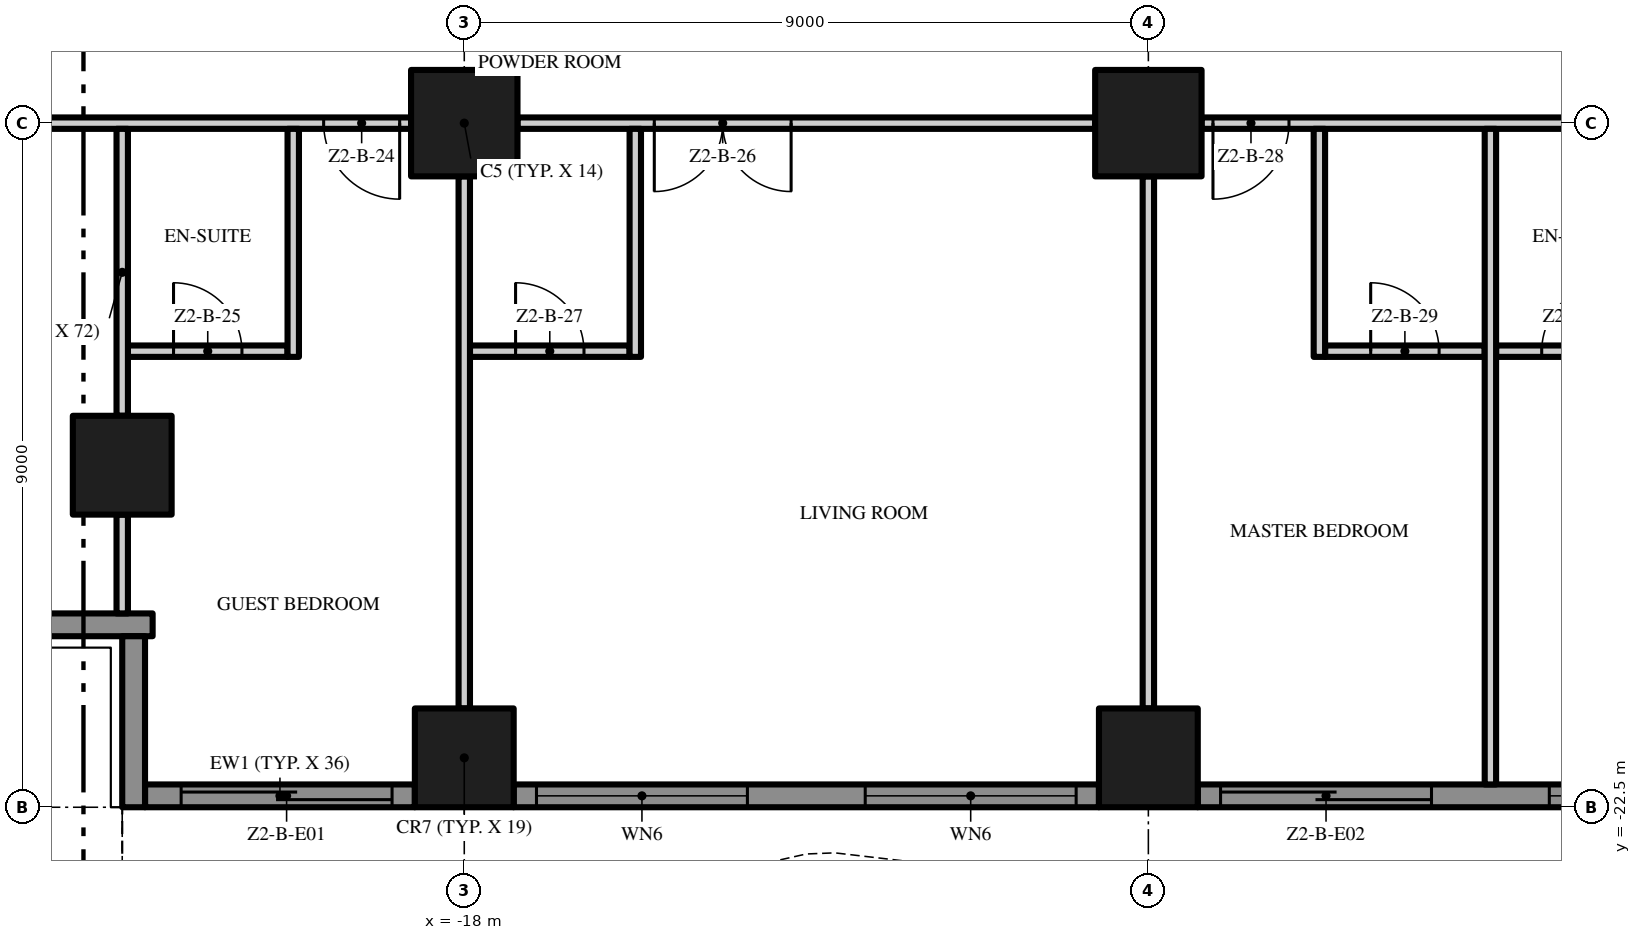
"""IFC4 building model, lengths in metres.
Left out: names, types, materials, properties, quantities, classifications, styles, units other than length and angle.
Written with IfcOpenShell. Run it as: python <this file> out.ifc"""

import sys

from ifc_helpers import new_model, si_unit, direction, frame, frame_2d, origin, origin_2d, place, context, subcontext, project, spatial, polyline, rectangle, outline, extrude, element, fill, save


model = new_model("IFC4")
c1 = context("Model", 3, precision=1e-05, world=origin(), true_north=direction((0.0, 1.0)))
c2 = subcontext(c1, "Body", "Model", "MODEL_VIEW")
j1 = project(units=[si_unit("LENGTHUNIT", "METRE"), si_unit("PLANEANGLEUNIT", "RADIAN")], contexts=[c1])
p1 = place(None, origin())
s1 = spatial("IfcSite", under=j1, at=p1, CompositionType="ELEMENT")
p2 = place(p1, origin())
s2 = spatial("IfcBuilding", under=s1, at=p2, CompositionType="ELEMENT")
p3 = place(p2, frame((0.0, 0.0, 80.8)))
s3 = spatial("IfcBuildingStorey", under=s2, at=p3, CompositionType="ELEMENT", Elevation=80.8)
p4 = place(p3, frame((-18.0, -13.5, 0.0), z_axis=(0.0, 0.0, 1.0), x_axis=(1.0, 0.0, 0.0)))
e1 = element("IfcColumn", 1, at=p4, inside=s3, PredefinedType="COLUMN", context=c2, shape_type="SweptSolid", body=[
    extrude(rectangle(XDim=1.4, YDim=1.4, at=origin_2d()), origin(), (0.0, 0.0, 1.0), 3.5),
])
for number, where, z_axis, x_axis in (
    (2, (-18.0, -21.85, 0.0), (0.0, 0.0, 1.0), (1.0, 0.0, 0.0)),
    (3, (-22.5, -18.0, 0.0), (0.0, 0.0, 1.0), (1.0, 0.0, 0.0)),
):
    element("IfcColumn", number, at=place(p3, frame(where, z_axis=z_axis, x_axis=x_axis)), inside=s3, PredefinedType="COLUMN", context=c2, shape_type="SweptSolid", body=[
        extrude(rectangle(XDim=1.3, YDim=1.3, at=origin_2d()), origin(), (0.0, 0.0, 1.0), 3.5),
    ])
p5 = place(p3, frame((-9.0, -13.5, 0.0), z_axis=(0.0, 0.0, 1.0), x_axis=(1.0, 0.0, 0.0)))
e4 = element("IfcColumn", 4, at=p5, inside=s3, PredefinedType="COLUMN", context=c2, shape_type="SweptSolid", body=[
    extrude(rectangle(XDim=1.4, YDim=1.4, at=origin_2d()), origin(), (0.0, 0.0, 1.0), 3.5),
])
p6 = place(p3, frame((-9.0, -21.85, 0.0), z_axis=(0.0, 0.0, 1.0), x_axis=(1.0, 0.0, 0.0)))
e5 = element("IfcColumn", 5, at=p6, inside=s3, PredefinedType="COLUMN", context=c2, shape_type="SweptSolid", body=[
    extrude(rectangle(XDim=1.3, YDim=1.3, at=origin_2d()), origin(), (0.0, 0.0, 1.0), 3.5),
])
p7 = place(p3, frame((-18.65, -22.35, 0.0), z_axis=(0.0, 0.0, 1.0), x_axis=(-1.0, 0.0, 0.0)))
e6 = element("IfcWall", 6, at=p7, inside=s3, PredefinedType="SOLIDWALL", context=c2, shape_type="SweptSolid", body=[
    extrude(rectangle(XDim=3.55, YDim=0.3, at=frame_2d((1.775, 0.0))), origin(), (0.0, 0.0, 1.0), 3.5),
])
p8 = place(p7, frame((0.3, 0.0, 0.0)))
e7 = element("IfcOpeningElement", 7, at=p8, cuts=e6, PredefinedType="OPENING", context=c2, shape_type="SweptSolid", body=[
    extrude(rectangle(XDim=2.775, YDim=2.4, at=frame_2d((1.387, 1.2))), frame((0.0, 0.16, 0.0), z_axis=(0.0, -1.0, 0.0), x_axis=(1.0, 0.0, 0.0)), (0.0, 0.0, 1.0), 0.32),
])
p9 = place(p3, frame((-9.65, -22.35, 0.0), z_axis=(0.0, 0.0, 1.0), x_axis=(-1.0, 0.0, 0.0)))
e8 = element("IfcWall", 8, at=p9, inside=s3, PredefinedType="SOLIDWALL", context=c2, shape_type="SweptSolid", body=[
    extrude(rectangle(XDim=7.7, YDim=0.3, at=frame_2d((3.85, 0.0))), origin(), (0.0, 0.0, 1.0), 3.5),
])
p10 = place(p9, frame((4.625, 0.0, 0.45)))
e9 = element("IfcOpeningElement", 9, at=p10, cuts=e8, PredefinedType="OPENING", context=c2, shape_type="SweptSolid", body=[
    extrude(rectangle(XDim=2.775, YDim=2.65, at=frame_2d((1.387, 1.325))), frame((0.0, 0.16, 0.0), z_axis=(0.0, -1.0, 0.0), x_axis=(1.0, 0.0, 0.0)), (0.0, 0.0, 1.0), 0.32),
])
p11 = place(p9, frame((0.3, 0.0, 0.45)))
e10 = element("IfcOpeningElement", 10, at=p11, cuts=e8, PredefinedType="OPENING", context=c2, shape_type="SweptSolid", body=[
    extrude(rectangle(XDim=2.775, YDim=2.65, at=frame_2d((1.387, 1.325))), frame((0.0, 0.16, 0.0), z_axis=(0.0, -1.0, 0.0), x_axis=(1.0, 0.0, 0.0)), (0.0, 0.0, 1.0), 0.32),
])
p12 = place(p3, frame((-0.65, -22.35, 0.0), z_axis=(0.0, 0.0, 1.0), x_axis=(-1.0, 0.0, 0.0)))
e11 = element("IfcWall", 11, at=p12, inside=s3, PredefinedType="SOLIDWALL", context=c2, shape_type="SweptSolid", body=[
    extrude(rectangle(XDim=7.7, YDim=0.3, at=frame_2d((3.85, 0.0))), origin(), (0.0, 0.0, 1.0), 3.5),
])
p13 = place(p12, frame((4.625, 0.0, 0.0)))
e12 = element("IfcOpeningElement", 12, at=p13, cuts=e11, PredefinedType="OPENING", context=c2, shape_type="SweptSolid", body=[
    extrude(rectangle(XDim=2.775, YDim=2.4, at=frame_2d((1.387, 1.2))), frame((0.0, 0.16, 0.0), z_axis=(0.0, -1.0, 0.0), x_axis=(1.0, 0.0, 0.0)), (0.0, 0.0, 1.0), 0.32),
])
p14 = place(p12, frame((0.3, 0.0, 0.45)))
e13 = element("IfcOpeningElement", 13, at=p14, cuts=e11, PredefinedType="OPENING", context=c2, shape_type="SweptSolid", body=[
    extrude(rectangle(XDim=2.775, YDim=2.65, at=frame_2d((1.387, 1.325))), frame((0.0, 0.16, 0.0), z_axis=(0.0, -1.0, 0.0), x_axis=(1.0, 0.0, 0.0)), (0.0, 0.0, 1.0), 0.32),
])
p15 = place(p3, frame((-22.1, -20.1, 0.0), z_axis=(0.0, 0.0, 1.0), x_axis=(-1.0, 0.0, 0.0)))
e14 = element("IfcWall", 14, at=p15, inside=s3, PredefinedType="SOLIDWALL", context=c2, shape_type="SweptSolid", body=[
    extrude(rectangle(XDim=2.35, YDim=0.3, at=frame_2d((1.175, 0.0))), origin(), (0.0, 0.0, 1.0), 3.5),
])
p16 = place(p3, frame((-22.35, -22.5, 0.0), z_axis=(0.0, 0.0, 1.0), x_axis=(0.0, 1.0, 0.0)))
e15 = element("IfcWall", 15, at=p16, inside=s3, PredefinedType="SOLIDWALL", context=c2, shape_type="SweptSolid", body=[
    extrude(rectangle(XDim=2.25, YDim=0.3, at=frame_2d((1.125, 0.0))), origin(), (0.0, 0.0, 1.0), 3.5),
])
p17 = place(p3, origin())
e16 = element("IfcWall", 16, at=p17, inside=s3, PredefinedType="USERDEFINED", context=c2, shape_type="SweptSolid", body=[
    extrude(outline(polyline([(-22.5, -25.149), (-21.0, -25.485), (-20.625, -25.5), (-19.5, -25.369), (-18.0, -24.845), (-16.5, -24.112), (-15.0, -23.451), (-13.5, -23.115), (-13.125, -23.1), (-12.0, -23.231), (-10.5, -23.755), (-9.0, -24.488), (-7.5, -25.149), (-6.0, -25.485), (-5.625, -25.5), (-4.5, -25.369), (-3.0, -24.845), (-1.5, -24.112), (0.0, -23.451), (1.5, -23.115), (1.875, -23.1), (3.0, -23.231), (4.5, -23.755), (6.0, -24.488), (7.5, -25.149), (9.0, -25.485), (9.375, -25.5), (10.5, -25.369), (12.0, -24.845), (13.5, -24.112), (15.0, -23.451), (16.5, -23.115), (16.875, -23.1), (18.0, -23.231), (19.5, -23.755), (21.0, -24.488), (22.5, -25.149), (22.601, -24.92), (21.105, -24.261), (19.596, -23.524), (18.056, -22.986), (16.885, -22.849), (16.467, -22.866), (14.921, -23.213), (13.395, -23.885), (11.904, -24.614), (10.444, -25.124), (9.365, -25.249), (9.033, -25.236), (7.579, -24.91), (6.105, -24.261), (4.596, -23.524), (3.056, -22.986), (1.885, -22.849), (1.467, -22.866), (-0.079, -23.213), (-1.605, -23.885), (-3.096, -24.614), (-4.556, -25.124), (-5.635, -25.249), (-5.967, -25.236), (-7.421, -24.91), (-8.895, -24.261), (-10.404, -23.524), (-11.944, -22.986), (-13.115, -22.849), (-13.533, -22.866), (-15.079, -23.213), (-16.605, -23.885), (-18.096, -24.614), (-19.556, -25.124), (-20.635, -25.249), (-20.967, -25.236), (-22.445, -24.905), (-22.5, -25.149)])), origin(), (0.0, 0.0, 1.0), 0.9),
])
p18 = place(p3, frame((-22.425, -16.5, 0.0), z_axis=(0.0, 0.0, 1.0), x_axis=(1.0, 0.0, 0.0)))
e17 = element("IfcWall", 17, at=p18, inside=s3, PredefinedType="PARTITIONING", context=c2, shape_type="SweptSolid", body=[
    extrude(rectangle(XDim=2.1, YDim=0.15, at=frame_2d((1.05, 0.0))), origin(), (0.0, 0.0, 1.0), 3.5),
])
p19 = place(p18, frame((0.6, 0.0, 0.0)))
e18 = element("IfcOpeningElement", 18, at=p19, cuts=e17, PredefinedType="OPENING", context=c2, shape_type="SweptSolid", body=[
    extrude(rectangle(XDim=0.9, YDim=2.1, at=frame_2d((0.45, 1.05))), frame((0.0, 0.085, 0.0), z_axis=(0.0, -1.0, 0.0), x_axis=(1.0, 0.0, 0.0)), (0.0, 0.0, 1.0), 0.17),
])
p20 = place(p3, frame((-17.925, -16.5, 0.0), z_axis=(0.0, 0.0, 1.0), x_axis=(1.0, 0.0, 0.0)))
e19 = element("IfcWall", 19, at=p20, inside=s3, PredefinedType="PARTITIONING", context=c2, shape_type="SweptSolid", body=[
    extrude(rectangle(XDim=2.1, YDim=0.15, at=frame_2d((1.05, 0.0))), origin(), (0.0, 0.0, 1.0), 3.5),
])
p21 = place(p20, frame((0.6, 0.0, 0.0)))
e20 = element("IfcOpeningElement", 20, at=p21, cuts=e19, PredefinedType="OPENING", context=c2, shape_type="SweptSolid", body=[
    extrude(rectangle(XDim=0.9, YDim=2.1, at=frame_2d((0.45, 1.05))), frame((0.0, 0.085, 0.0), z_axis=(0.0, -1.0, 0.0), x_axis=(1.0, 0.0, 0.0)), (0.0, 0.0, 1.0), 0.17),
])
p22 = place(p3, frame((-6.675, -16.5, 0.0), z_axis=(0.0, 0.0, 1.0), x_axis=(1.0, 0.0, 0.0)))
e21 = element("IfcWall", 21, at=p22, inside=s3, PredefinedType="PARTITIONING", context=c2, shape_type="SweptSolid", body=[
    extrude(rectangle(XDim=2.1, YDim=0.15, at=frame_2d((1.05, 0.0))), origin(), (0.0, 0.0, 1.0), 3.5),
])
p23 = place(p22, frame((0.6, 0.0, 0.0)))
e22 = element("IfcOpeningElement", 22, at=p23, cuts=e21, PredefinedType="OPENING", context=c2, shape_type="SweptSolid", body=[
    extrude(rectangle(XDim=0.9, YDim=2.1, at=frame_2d((0.45, 1.05))), frame((0.0, 0.085, 0.0), z_axis=(0.0, -1.0, 0.0), x_axis=(1.0, 0.0, 0.0)), (0.0, 0.0, 1.0), 0.17),
])
p24 = place(p3, frame((-4.425, -16.5, 0.0), z_axis=(0.0, 0.0, 1.0), x_axis=(1.0, 0.0, 0.0)))
e23 = element("IfcWall", 23, at=p24, inside=s3, PredefinedType="PARTITIONING", context=c2, shape_type="SweptSolid", body=[
    extrude(rectangle(XDim=2.1, YDim=0.15, at=frame_2d((1.05, 0.0))), origin(), (0.0, 0.0, 1.0), 3.5),
])
p25 = place(p24, frame((0.6, 0.0, 0.0)))
e24 = element("IfcOpeningElement", 24, at=p25, cuts=e23, PredefinedType="OPENING", context=c2, shape_type="SweptSolid", body=[
    extrude(rectangle(XDim=0.9, YDim=2.1, at=frame_2d((0.45, 1.05))), frame((0.0, 0.085, 0.0), z_axis=(0.0, -1.0, 0.0), x_axis=(1.0, 0.0, 0.0)), (0.0, 0.0, 1.0), 0.17),
])
p26 = place(p3, frame((-18.7, -13.5, 0.0), z_axis=(0.0, 0.0, 1.0), x_axis=(-1.0, 0.0, 0.0)))
e25 = element("IfcWall", 25, at=p26, inside=s3, PredefinedType="PARTITIONING", context=c2, shape_type="SweptSolid", body=[
    extrude(rectangle(XDim=7.0, YDim=0.15, at=frame_2d((3.5, 0.0))), origin(), (0.0, 0.0, 1.0), 3.5),
])
p27 = place(p26, frame((5.55, 0.0, 0.0)))
e26 = element("IfcOpeningElement", 26, at=p27, cuts=e25, PredefinedType="OPENING", context=c2, shape_type="SweptSolid", body=[
    extrude(rectangle(XDim=1.0, YDim=2.4, at=frame_2d((0.5, 1.2))), frame((0.0, 0.085, 0.0), z_axis=(0.0, -1.0, 0.0), x_axis=(1.0, 0.0, 0.0)), (0.0, 0.0, 1.0), 0.17),
])
p28 = place(p26, frame((0.15, 0.0, 0.0)))
e27 = element("IfcOpeningElement", 27, at=p28, cuts=e25, PredefinedType="OPENING", context=c2, shape_type="SweptSolid", body=[
    extrude(rectangle(XDim=1.0, YDim=2.4, at=frame_2d((0.5, 1.2))), frame((0.0, 0.085, 0.0), z_axis=(0.0, -1.0, 0.0), x_axis=(1.0, 0.0, 0.0)), (0.0, 0.0, 1.0), 0.17),
])
p29 = place(p3, frame((-9.7, -13.5, 0.0), z_axis=(0.0, 0.0, 1.0), x_axis=(-1.0, 0.0, 0.0)))
e28 = element("IfcWall", 28, at=p29, inside=s3, PredefinedType="PARTITIONING", context=c2, shape_type="SweptSolid", body=[
    extrude(rectangle(XDim=7.6, YDim=0.15, at=frame_2d((3.8, 0.0))), origin(), (0.0, 0.0, 1.0), 3.5),
])
p30 = place(p29, frame((4.0, 0.0, 0.0)))
e29 = element("IfcOpeningElement", 29, at=p30, cuts=e28, PredefinedType="OPENING", context=c2, shape_type="SweptSolid", body=[
    extrude(rectangle(XDim=1.8, YDim=2.4, at=frame_2d((0.9, 1.2))), frame((0.0, 0.085, 0.0), z_axis=(0.0, -1.0, 0.0), x_axis=(1.0, 0.0, 0.0)), (0.0, 0.0, 1.0), 0.17),
])
p31 = place(p3, frame((-0.7, -13.5, 0.0), z_axis=(0.0, 0.0, 1.0), x_axis=(-1.0, 0.0, 0.0)))
e30 = element("IfcWall", 30, at=p31, inside=s3, PredefinedType="PARTITIONING", context=c2, shape_type="SweptSolid", body=[
    extrude(rectangle(XDim=7.6, YDim=0.15, at=frame_2d((3.8, 0.0))), origin(), (0.0, 0.0, 1.0), 3.5),
])
p32 = place(p31, frame((6.45, 0.0, 0.0)))
e31 = element("IfcOpeningElement", 31, at=p32, cuts=e30, PredefinedType="OPENING", context=c2, shape_type="SweptSolid", body=[
    extrude(rectangle(XDim=1.0, YDim=2.4, at=frame_2d((0.5, 1.2))), frame((0.0, 0.085, 0.0), z_axis=(0.0, -1.0, 0.0), x_axis=(1.0, 0.0, 0.0)), (0.0, 0.0, 1.0), 0.17),
])
p33 = place(p31, frame((0.15, 0.0, 0.0)))
e32 = element("IfcOpeningElement", 32, at=p33, cuts=e30, PredefinedType="OPENING", context=c2, shape_type="SweptSolid", body=[
    extrude(rectangle(XDim=1.0, YDim=2.4, at=frame_2d((0.5, 1.2))), frame((0.0, 0.085, 0.0), z_axis=(0.0, -1.0, 0.0), x_axis=(1.0, 0.0, 0.0)), (0.0, 0.0, 1.0), 0.17),
])
p34 = place(p3, frame((-22.5, -19.95, 0.0), z_axis=(0.0, 0.0, 1.0), x_axis=(0.0, 1.0, 0.0)))
e33 = element("IfcWall", 33, at=p34, inside=s3, PredefinedType="PARTITIONING", context=c2, shape_type="SweptSolid", body=[
    extrude(rectangle(XDim=1.3, YDim=0.15, at=frame_2d((0.65, 0.0))), origin(), (0.0, 0.0, 1.0), 3.5),
])
p35 = place(p3, frame((-22.5, -17.35, 0.0), z_axis=(0.0, 0.0, 1.0), x_axis=(0.0, 1.0, 0.0)))
e34 = element("IfcWall", 34, at=p35, inside=s3, PredefinedType="PARTITIONING", context=c2, shape_type="SweptSolid", body=[
    extrude(rectangle(XDim=3.775, YDim=0.15, at=frame_2d((1.887, 0.0))), origin(), (0.0, 0.0, 1.0), 3.5),
])
p36 = place(p3, frame((-20.25, -16.575, 0.0), z_axis=(0.0, 0.0, 1.0), x_axis=(0.0, 1.0, 0.0)))
e35 = element("IfcWall", 35, at=p36, inside=s3, PredefinedType="PARTITIONING", context=c2, shape_type="SweptSolid", body=[
    extrude(rectangle(XDim=3.0, YDim=0.15, at=frame_2d((1.5, 0.0))), origin(), (0.0, 0.0, 1.0), 3.5),
])
p37 = place(p3, frame((-18.0, -21.2, 0.0), z_axis=(0.0, 0.0, 1.0), x_axis=(0.0, 1.0, 0.0)))
e36 = element("IfcWall", 36, at=p37, inside=s3, PredefinedType="PARTITIONING", context=c2, shape_type="SweptSolid", body=[
    extrude(rectangle(XDim=7.0, YDim=0.15, at=frame_2d((3.5, 0.0))), origin(), (0.0, 0.0, 1.0), 3.5),
])
p38 = place(p3, frame((-15.75, -16.575, 0.0), z_axis=(0.0, 0.0, 1.0), x_axis=(0.0, 1.0, 0.0)))
e37 = element("IfcWall", 37, at=p38, inside=s3, PredefinedType="PARTITIONING", context=c2, shape_type="SweptSolid", body=[
    extrude(rectangle(XDim=3.0, YDim=0.15, at=frame_2d((1.5, 0.0))), origin(), (0.0, 0.0, 1.0), 3.5),
])
p39 = place(p3, frame((-9.0, -21.2, 0.0), z_axis=(0.0, 0.0, 1.0), x_axis=(0.0, 1.0, 0.0)))
e38 = element("IfcWall", 38, at=p39, inside=s3, PredefinedType="PARTITIONING", context=c2, shape_type="SweptSolid", body=[
    extrude(rectangle(XDim=7.0, YDim=0.15, at=frame_2d((3.5, 0.0))), origin(), (0.0, 0.0, 1.0), 3.5),
])
p40 = place(p3, frame((-6.75, -16.575, 0.0), z_axis=(0.0, 0.0, 1.0), x_axis=(0.0, 1.0, 0.0)))
e39 = element("IfcWall", 39, at=p40, inside=s3, PredefinedType="PARTITIONING", context=c2, shape_type="SweptSolid", body=[
    extrude(rectangle(XDim=3.0, YDim=0.15, at=frame_2d((1.5, 0.0))), origin(), (0.0, 0.0, 1.0), 3.5),
])
p41 = place(p3, frame((-4.5, -22.2, 0.0), z_axis=(0.0, 0.0, 1.0), x_axis=(0.0, 1.0, 0.0)))
e40 = element("IfcWall", 40, at=p41, inside=s3, PredefinedType="PARTITIONING", context=c2, shape_type="SweptSolid", body=[
    extrude(rectangle(XDim=8.625, YDim=0.15, at=frame_2d((4.312, 0.0))), origin(), (0.0, 0.0, 1.0), 3.5),
])
p42 = place(p8, origin())
e41 = element("IfcDoor", 41, at=p42, inside=s3, OperationType="SINGLE_SWING_LEFT", PredefinedType="DOOR", context=c2, shape_type="SweptSolid", body=[
    extrude(rectangle(XDim=2.775, YDim=2.4, at=frame_2d((1.387, 1.2))), frame((0.0, 0.025, 0.0), z_axis=(0.0, -1.0, 0.0), x_axis=(1.0, 0.0, 0.0)), (0.0, 0.0, 1.0), 0.05),
])
fill(e7, e41)
p43 = place(p10, origin())
e42 = element("IfcWindow", 42, at=p43, inside=s3, PartitioningType="SINGLE_PANEL", PredefinedType="WINDOW", context=c2, shape_type="SweptSolid", body=[
    extrude(rectangle(XDim=2.775, YDim=2.65, at=frame_2d((1.387, 1.325))), frame((0.0, 0.03, 0.0), z_axis=(0.0, -1.0, 0.0), x_axis=(1.0, 0.0, 0.0)), (0.0, 0.0, 1.0), 0.06),
])
fill(e9, e42)
p44 = place(p11, origin())
e43 = element("IfcWindow", 43, at=p44, inside=s3, PartitioningType="SINGLE_PANEL", PredefinedType="WINDOW", context=c2, shape_type="SweptSolid", body=[
    extrude(rectangle(XDim=2.775, YDim=2.65, at=frame_2d((1.387, 1.325))), frame((0.0, 0.03, 0.0), z_axis=(0.0, -1.0, 0.0), x_axis=(1.0, 0.0, 0.0)), (0.0, 0.0, 1.0), 0.06),
])
fill(e10, e43)
p45 = place(p13, origin())
e44 = element("IfcDoor", 44, at=p45, inside=s3, OperationType="SINGLE_SWING_LEFT", PredefinedType="DOOR", context=c2, shape_type="SweptSolid", body=[
    extrude(rectangle(XDim=2.775, YDim=2.4, at=frame_2d((1.387, 1.2))), frame((0.0, 0.025, 0.0), z_axis=(0.0, -1.0, 0.0), x_axis=(1.0, 0.0, 0.0)), (0.0, 0.0, 1.0), 0.05),
])
fill(e12, e44)
p46 = place(p14, origin())
e45 = element("IfcWindow", 45, at=p46, inside=s3, PartitioningType="SINGLE_PANEL", PredefinedType="WINDOW", context=c2, shape_type="SweptSolid", body=[
    extrude(rectangle(XDim=2.775, YDim=2.65, at=frame_2d((1.387, 1.325))), frame((0.0, 0.03, 0.0), z_axis=(0.0, -1.0, 0.0), x_axis=(1.0, 0.0, 0.0)), (0.0, 0.0, 1.0), 0.06),
])
fill(e13, e45)
p47 = place(p28, origin())
e46 = element("IfcDoor", 46, at=p47, inside=s3, OperationType="SINGLE_SWING_LEFT", PredefinedType="DOOR", context=c2, shape_type="SweptSolid", body=[
    extrude(rectangle(XDim=1.0, YDim=2.4, at=frame_2d((0.5, 1.2))), frame((0.0, 0.025, 0.0), z_axis=(0.0, -1.0, 0.0), x_axis=(1.0, 0.0, 0.0)), (0.0, 0.0, 1.0), 0.05),
])
fill(e27, e46)
p48 = place(p19, origin())
e47 = element("IfcDoor", 47, at=p48, inside=s3, OperationType="SINGLE_SWING_LEFT", PredefinedType="DOOR", context=c2, shape_type="SweptSolid", body=[
    extrude(rectangle(XDim=0.9, YDim=2.1, at=frame_2d((0.45, 1.05))), frame((0.0, 0.025, 0.0), z_axis=(0.0, -1.0, 0.0), x_axis=(1.0, 0.0, 0.0)), (0.0, 0.0, 1.0), 0.05),
])
fill(e18, e47)
p49 = place(p30, origin())
e48 = element("IfcDoor", 48, at=p49, inside=s3, OperationType="DOUBLE_DOOR_SINGLE_SWING", PredefinedType="DOOR", context=c2, shape_type="SweptSolid", body=[
    extrude(rectangle(XDim=1.8, YDim=2.4, at=frame_2d((0.9, 1.2))), frame((0.0, 0.025, 0.0), z_axis=(0.0, -1.0, 0.0), x_axis=(1.0, 0.0, 0.0)), (0.0, 0.0, 1.0), 0.05),
])
fill(e29, e48)
p50 = place(p21, origin())
e49 = element("IfcDoor", 49, at=p50, inside=s3, OperationType="SINGLE_SWING_LEFT", PredefinedType="DOOR", context=c2, shape_type="SweptSolid", body=[
    extrude(rectangle(XDim=0.9, YDim=2.1, at=frame_2d((0.45, 1.05))), frame((0.0, 0.025, 0.0), z_axis=(0.0, -1.0, 0.0), x_axis=(1.0, 0.0, 0.0)), (0.0, 0.0, 1.0), 0.05),
])
fill(e20, e49)
p51 = place(p32, origin())
e50 = element("IfcDoor", 50, at=p51, inside=s3, OperationType="SINGLE_SWING_RIGHT", PredefinedType="DOOR", context=c2, shape_type="SweptSolid", body=[
    extrude(rectangle(XDim=1.0, YDim=2.4, at=frame_2d((0.5, 1.2))), frame((0.0, 0.025, 0.0), z_axis=(0.0, -1.0, 0.0), x_axis=(1.0, 0.0, 0.0)), (0.0, 0.0, 1.0), 0.05),
])
fill(e31, e50)
p52 = place(p23, origin())
e51 = element("IfcDoor", 51, at=p52, inside=s3, OperationType="SINGLE_SWING_LEFT", PredefinedType="DOOR", context=c2, shape_type="SweptSolid", body=[
    extrude(rectangle(XDim=0.9, YDim=2.1, at=frame_2d((0.45, 1.05))), frame((0.0, 0.025, 0.0), z_axis=(0.0, -1.0, 0.0), x_axis=(1.0, 0.0, 0.0)), (0.0, 0.0, 1.0), 0.05),
])
fill(e22, e51)
p53 = place(p25, origin())
e52 = element("IfcDoor", 52, at=p53, inside=s3, OperationType="SINGLE_SWING_RIGHT", PredefinedType="DOOR", context=c2, shape_type="SweptSolid", body=[
    extrude(rectangle(XDim=0.9, YDim=2.1, at=frame_2d((0.45, 1.05))), frame((0.0, 0.025, 0.0), z_axis=(0.0, -1.0, 0.0), x_axis=(1.0, 0.0, 0.0)), (0.0, 0.0, 1.0), 0.05),
])
fill(e24, e52)
save(model, sys.argv[1])
